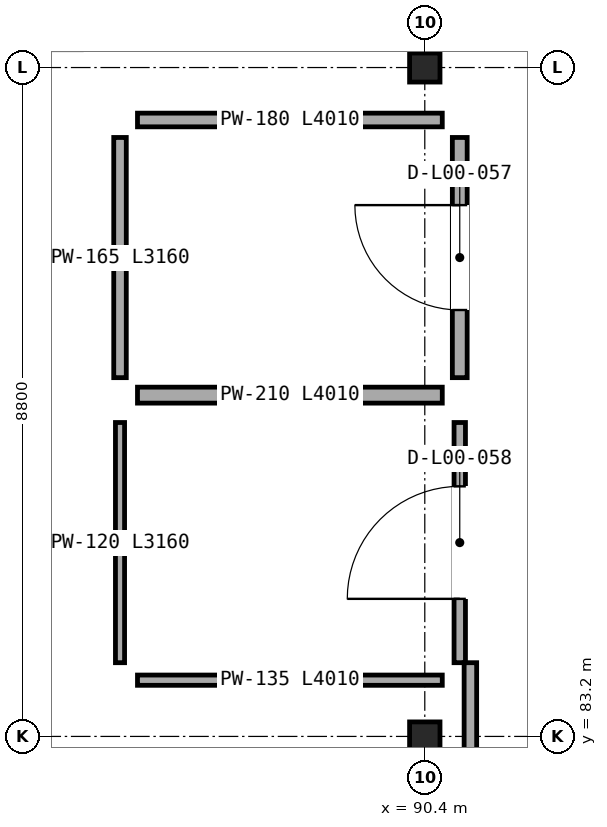
"""IFC4 building model, lengths in metres.
Left out: names, types, materials, properties, quantities, classifications, styles, units other than length and angle.
Written with IfcOpenShell. Run it as: python <this file> out.ifc"""

import sys

from ifc_helpers import new_model, si_unit, direction, frame, frame_2d, origin, origin_2d, place, context, subcontext, project, spatial, rectangle, i_section, extrude, element, fill, save


model = new_model("IFC4")
c1 = context("Model", 3, precision=1e-05, world=origin(), true_north=direction((0.0, 1.0)))
c2 = subcontext(c1, "Body", "Model", "MODEL_VIEW")
j1 = project(units=[si_unit("LENGTHUNIT", "METRE"), si_unit("PLANEANGLEUNIT", "RADIAN")], contexts=[c1])
p1 = place(None, origin())
s1 = spatial("IfcSite", under=j1, at=p1, CompositionType="ELEMENT")
p2 = place(p1, origin())
s2 = spatial("IfcBuilding", under=s1, at=p2, CompositionType="ELEMENT")
p3 = place(p2, origin())
s3 = spatial("IfcBuildingStorey", under=s2, at=p3, CompositionType="ELEMENT", Elevation=0.0)
for number, where, z_axis, x_axis in (
    (1, (90.4, 83.2, 0.0), (0.0, 0.0, 1.0), (1.0, 0.0, 0.0)),
    (2, (90.4, 92.0, 0.0), (0.0, 0.0, 1.0), (1.0, 0.0, 0.0)),
):
    element("IfcColumn", number, at=place(p3, frame(where, z_axis=z_axis, x_axis=x_axis)), inside=s3, PredefinedType="COLUMN", context=c2, shape_type="SweptSolid", body=[
        extrude(i_section(OverallWidth=0.4, OverallDepth=0.382, WebThickness=0.025, FlangeThickness=0.036, at=origin_2d()), origin(), (0.0, 0.0, 1.0), 5.6),
    ])
p4 = place(p3, frame((90.63, 87.69, 0.0), z_axis=(0.0, 0.0, 1.0), x_axis=(-1.0, 0.0, 0.0)))
e3 = element("IfcWall", 3, at=p4, inside=s3, PredefinedType="PARTITIONING", context=c2, shape_type="SweptSolid", body=[
    extrude(rectangle(XDim=4.01, YDim=0.21, at=frame_2d((2.005, 0.0))), origin(), (0.0, 0.0, 1.0), 4.787),
])
p5 = place(p3, frame((90.86, 91.08, 0.0), z_axis=(0.0, 0.0, 1.0), x_axis=(0.0, -1.0, 0.0)))
e4 = element("IfcWall", 4, at=p5, inside=s3, PredefinedType="PARTITIONING", context=c2, shape_type="SweptSolid", body=[
    extrude(rectangle(XDim=3.16, YDim=0.195, at=frame_2d((1.58, 0.0))), origin(), (0.0, 0.0, 1.0), 5.23),
])
p6 = place(p5, frame((0.89, 0.0, 0.0)))
e5 = element("IfcOpeningElement", 5, at=p6, cuts=e4, PredefinedType="OPENING", context=c2, shape_type="SweptSolid", body=[
    extrude(rectangle(XDim=1.38, YDim=2.24, at=frame_2d((0.69, 1.12))), frame((0.0, 0.107, 0.0), z_axis=(0.0, -1.0, 0.0), x_axis=(1.0, 0.0, 0.0)), (0.0, 0.0, 1.0), 0.215),
])
p7 = place(p3, frame((86.62, 91.31, 0.0), z_axis=(0.0, 0.0, 1.0), x_axis=(1.0, 0.0, 0.0)))
e6 = element("IfcWall", 6, at=p7, inside=s3, PredefinedType="PARTITIONING", context=c2, shape_type="SweptSolid", body=[
    extrude(rectangle(XDim=4.01, YDim=0.18, at=frame_2d((2.005, 0.0))), origin(), (0.0, 0.0, 1.0), 4.787),
])
p8 = place(p3, frame((86.39, 87.92, 0.0), z_axis=(0.0, 0.0, 1.0), x_axis=(0.0, 1.0, 0.0)))
e7 = element("IfcWall", 7, at=p8, inside=s3, PredefinedType="PARTITIONING", context=c2, shape_type="SweptSolid", body=[
    extrude(rectangle(XDim=3.16, YDim=0.165, at=frame_2d((1.58, 0.0))), origin(), (0.0, 0.0, 1.0), 5.23),
])
p9 = place(p3, frame((90.86, 87.33, 0.0), z_axis=(0.0, 0.0, 1.0), x_axis=(0.0, -1.0, 0.0)))
e8 = element("IfcWall", 8, at=p9, inside=s3, PredefinedType="PARTITIONING", context=c2, shape_type="SweptSolid", body=[
    extrude(rectangle(XDim=3.16, YDim=0.15, at=frame_2d((1.58, 0.0))), origin(), (0.0, 0.0, 1.0), 5.23),
])
p10 = place(p9, frame((0.84, 0.0, 0.0)))
e9 = element("IfcOpeningElement", 9, at=p10, cuts=e8, PredefinedType="OPENING", context=c2, shape_type="SweptSolid", body=[
    extrude(rectangle(XDim=1.48, YDim=2.24, at=frame_2d((0.74, 1.12))), frame((0.0, 0.085, 0.0), z_axis=(0.0, -1.0, 0.0), x_axis=(1.0, 0.0, 0.0)), (0.0, 0.0, 1.0), 0.17),
])
p11 = place(p3, frame((90.63, 83.94, 0.0), z_axis=(0.0, 0.0, 1.0), x_axis=(-1.0, 0.0, 0.0)))
e10 = element("IfcWall", 10, at=p11, inside=s3, PredefinedType="PARTITIONING", context=c2, shape_type="SweptSolid", body=[
    extrude(rectangle(XDim=4.01, YDim=0.135, at=frame_2d((2.005, 0.0))), origin(), (0.0, 0.0, 1.0), 4.787),
])
p12 = place(p3, frame((86.39, 84.17, 0.0), z_axis=(0.0, 0.0, 1.0), x_axis=(0.0, 1.0, 0.0)))
e11 = element("IfcWall", 11, at=p12, inside=s3, PredefinedType="PARTITIONING", context=c2, shape_type="SweptSolid", body=[
    extrude(rectangle(XDim=3.16, YDim=0.12, at=frame_2d((1.58, 0.0))), origin(), (0.0, 0.0, 1.0), 5.23),
])
p13 = place(p3, frame((91.0, 84.17, 0.0), z_axis=(0.0, 0.0, 1.0), x_axis=(0.0, -1.0, 0.0)))
e12 = element("IfcWall", 12, at=p13, inside=s3, PredefinedType="PARTITIONING", context=c2, shape_type="SweptSolid", body=[
    extrude(rectangle(XDim=4.29, YDim=0.165, at=frame_2d((2.145, 0.0))), origin(), (0.0, 0.0, 1.0), 4.708),
])
p14 = place(p6, frame((1.38, 0.0, 0.0), z_axis=(0.0, 0.0, 1.0), x_axis=(-1.0, 0.0, 0.0)))
e13 = element("IfcDoor", 13, at=p14, inside=s3, OperationType="SINGLE_SWING_LEFT", PredefinedType="DOOR", context=c2, shape_type="SweptSolid", body=[
    extrude(rectangle(XDim=1.38, YDim=2.24, at=frame_2d((0.69, 1.12))), frame((0.0, 0.025, 0.0), z_axis=(0.0, -1.0, 0.0), x_axis=(1.0, 0.0, 0.0)), (0.0, 0.0, 1.0), 0.05),
])
fill(e5, e13)
p15 = place(p10, frame((1.48, 0.0, 0.0), z_axis=(0.0, 0.0, 1.0), x_axis=(-1.0, 0.0, 0.0)))
e14 = element("IfcDoor", 14, at=p15, inside=s3, OperationType="SINGLE_SWING_RIGHT", PredefinedType="DOOR", context=c2, shape_type="SweptSolid", body=[
    extrude(rectangle(XDim=1.48, YDim=2.24, at=frame_2d((0.74, 1.12))), frame((0.0, 0.025, 0.0), z_axis=(0.0, -1.0, 0.0), x_axis=(1.0, 0.0, 0.0)), (0.0, 0.0, 1.0), 0.05),
])
fill(e9, e14)
save(model, sys.argv[1])
